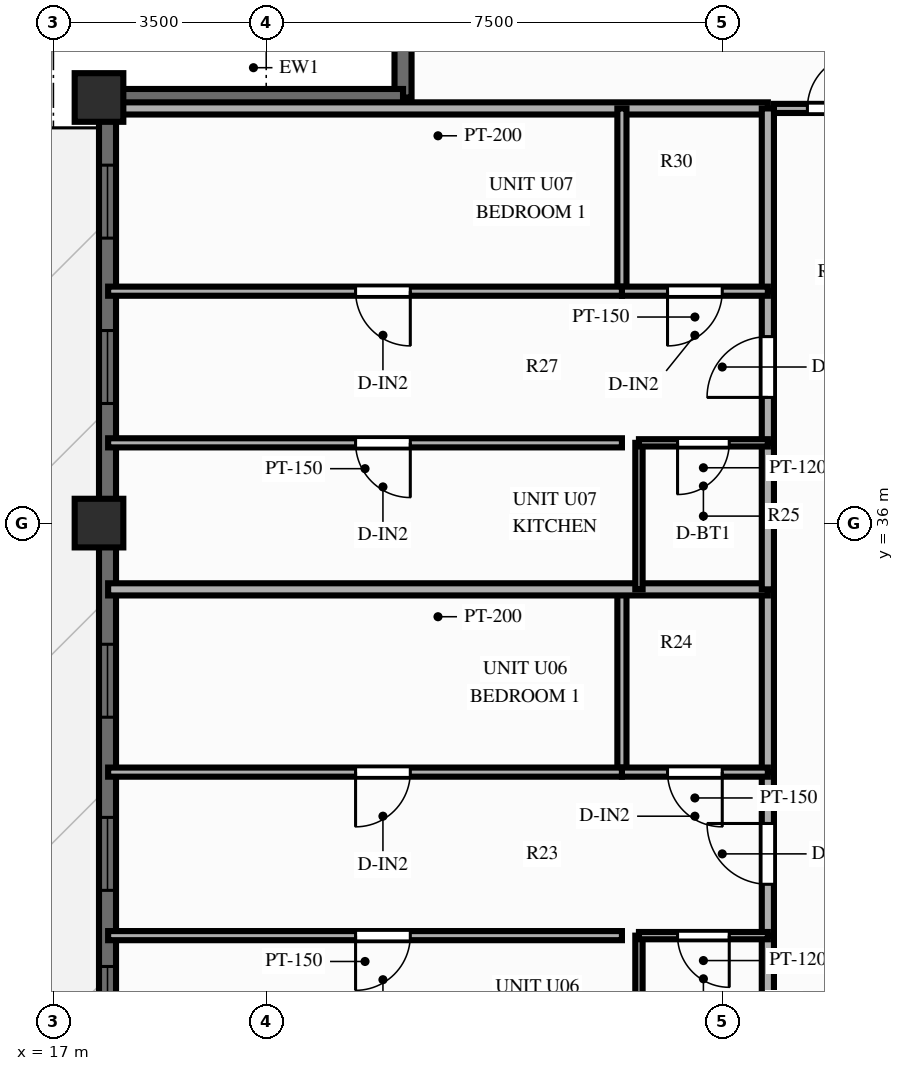
"""IFC4 building model, lengths in metres.
Left out: names, types, materials, properties, quantities, classifications, styles, units other than length and angle.
Written with IfcOpenShell. Run it as: python <this file> out.ifc"""

import sys

from ifc_helpers import new_model, si_unit, direction, frame, frame_2d, origin, origin_2d, place, context, subcontext, project, spatial, rectangle, extrude, source, transform, mapped, element, fill, save


model = new_model("IFC4")
c1 = context("Model", 3, precision=1e-05, world=origin(), true_north=direction((0.0, 1.0)))
c2 = subcontext(c1, "Body", "Model", "MODEL_VIEW")
j1 = project(units=[si_unit("LENGTHUNIT", "METRE"), si_unit("PLANEANGLEUNIT", "RADIAN")], contexts=[c1])
p1 = place(None, origin())
s1 = spatial("IfcSite", under=j1, at=p1, CompositionType="ELEMENT")
p2 = place(p1, origin())
s2 = spatial("IfcBuilding", under=s1, at=p2, CompositionType="ELEMENT")
p3 = place(p2, frame((0.0, 0.0, 189.7)))
s3 = spatial("IfcBuildingStorey", under=s2, at=p3, CompositionType="ELEMENT", Elevation=189.7)
m1 = source(origin(), c2, "Body", "SweptSolid", [
    extrude(rectangle(XDim=0.8, YDim=0.8, at=origin_2d()), origin(), (0.0, 0.0, 1.0), 3.0),
])
for number, where, z_axis, x_axis in (
    (1, (17.75, 43.0, 0.0), (0.0, 0.0, 1.0), (1.0, 0.0, 0.0)),
    (2, (17.75, 36.0, 0.0), (0.0, 0.0, 1.0), (1.0, 0.0, 0.0)),
):
    element("IfcColumn", number, at=place(p3, frame(where, z_axis=z_axis, x_axis=x_axis)), inside=s3, PredefinedType="COLUMN", context=c2, shape_type="MappedRepresentation", body=[
        mapped(m1, transform((0.0, 0.0, 0.0), scale=1.0)),
    ])
p4 = place(p3, frame((17.89, 11.0, 0.0), z_axis=(0.0, 0.0, 1.0), x_axis=(0.0, 1.0, 0.0)))
e3 = element("IfcWall", 3, at=p4, inside=s3, PredefinedType="SOLIDWALL", context=c2, shape_type="SweptSolid", body=[
    extrude(rectangle(XDim=32.0, YDim=0.28, at=frame_2d((16.0, 0.0))), origin(), (0.0, 0.0, 1.0), 2.28),
])
p5 = place(p4, frame((0.717, 0.0, 0.25)))
e4 = element("IfcOpeningElement", 4, at=p5, cuts=e3, PredefinedType="OPENING", context=c2, shape_type="SweptSolid", body=[
    extrude(rectangle(XDim=1.2, YDim=1.5, at=frame_2d((0.6, 0.75))), frame((0.0, 0.152, 0.0), z_axis=(0.0, -1.0, 0.0), x_axis=(1.0, 0.0, 0.0)), (0.0, 0.0, 1.0), 0.304),
])
p6 = place(p4, frame((3.139, 0.0, 0.25)))
e5 = element("IfcOpeningElement", 5, at=p6, cuts=e3, PredefinedType="OPENING", context=c2, shape_type="SweptSolid", body=[
    extrude(rectangle(XDim=1.2, YDim=1.5, at=frame_2d((0.6, 0.75))), frame((0.0, 0.152, 0.0), z_axis=(0.0, -1.0, 0.0), x_axis=(1.0, 0.0, 0.0)), (0.0, 0.0, 1.0), 0.304),
])
p7 = place(p4, frame((5.447, 0.0, 0.25)))
e6 = element("IfcOpeningElement", 6, at=p7, cuts=e3, PredefinedType="OPENING", context=c2, shape_type="SweptSolid", body=[
    extrude(rectangle(XDim=0.95, YDim=1.5, at=frame_2d((0.475, 0.75))), frame((0.0, 0.152, 0.0), z_axis=(0.0, -1.0, 0.0), x_axis=(1.0, 0.0, 0.0)), (0.0, 0.0, 1.0), 0.304),
])
p8 = place(p4, frame((8.597, 0.0, 0.25)))
e7 = element("IfcOpeningElement", 7, at=p8, cuts=e3, PredefinedType="OPENING", context=c2, shape_type="SweptSolid", body=[
    extrude(rectangle(XDim=1.2, YDim=1.5, at=frame_2d((0.6, 0.75))), frame((0.0, 0.152, 0.0), z_axis=(0.0, -1.0, 0.0), x_axis=(1.0, 0.0, 0.0)), (0.0, 0.0, 1.0), 0.304),
])
p9 = place(p4, frame((11.05, 0.0, 0.25)))
e8 = element("IfcOpeningElement", 8, at=p9, cuts=e3, PredefinedType="OPENING", context=c2, shape_type="SweptSolid", body=[
    extrude(rectangle(XDim=1.2, YDim=1.5, at=frame_2d((0.6, 0.75))), frame((0.0, 0.152, 0.0), z_axis=(0.0, -1.0, 0.0), x_axis=(1.0, 0.0, 0.0)), (0.0, 0.0, 1.0), 0.304),
])
p10 = place(p4, frame((13.697, 0.0, 0.0)))
e9 = element("IfcOpeningElement", 9, at=p10, cuts=e3, PredefinedType="OPENING", context=c2, shape_type="SweptSolid", body=[
    extrude(rectangle(XDim=1.6, YDim=2.15, at=frame_2d((0.8, 1.075))), frame((0.0, 0.152, 0.0), z_axis=(0.0, -1.0, 0.0), x_axis=(1.0, 0.0, 0.0)), (0.0, 0.0, 1.0), 0.304),
])
p11 = place(p4, frame((16.507, 0.0, 0.25)))
e10 = element("IfcOpeningElement", 10, at=p11, cuts=e3, PredefinedType="OPENING", context=c2, shape_type="SweptSolid", body=[
    extrude(rectangle(XDim=1.2, YDim=1.5, at=frame_2d((0.6, 0.75))), frame((0.0, 0.152, 0.0), z_axis=(0.0, -1.0, 0.0), x_axis=(1.0, 0.0, 0.0)), (0.0, 0.0, 1.0), 0.304),
])
p12 = place(p4, frame((18.959, 0.0, 0.25)))
e11 = element("IfcOpeningElement", 11, at=p12, cuts=e3, PredefinedType="OPENING", context=c2, shape_type="SweptSolid", body=[
    extrude(rectangle(XDim=1.2, YDim=1.5, at=frame_2d((0.6, 0.75))), frame((0.0, 0.152, 0.0), z_axis=(0.0, -1.0, 0.0), x_axis=(1.0, 0.0, 0.0)), (0.0, 0.0, 1.0), 0.304),
])
p13 = place(p4, frame((21.807, 0.0, 0.25)))
e12 = element("IfcOpeningElement", 12, at=p13, cuts=e3, PredefinedType="OPENING", context=c2, shape_type="SweptSolid", body=[
    extrude(rectangle(XDim=1.2, YDim=1.5, at=frame_2d((0.6, 0.75))), frame((0.0, 0.152, 0.0), z_axis=(0.0, -1.0, 0.0), x_axis=(1.0, 0.0, 0.0)), (0.0, 0.0, 1.0), 0.304),
])
p14 = place(p4, frame((26.967, 0.0, 0.25)))
e13 = element("IfcOpeningElement", 13, at=p14, cuts=e3, PredefinedType="OPENING", context=c2, shape_type="SweptSolid", body=[
    extrude(rectangle(XDim=1.2, YDim=1.5, at=frame_2d((0.6, 0.75))), frame((0.0, 0.152, 0.0), z_axis=(0.0, -1.0, 0.0), x_axis=(1.0, 0.0, 0.0)), (0.0, 0.0, 1.0), 0.304),
])
p15 = place(p4, frame((29.687, 0.0, 0.25)))
e14 = element("IfcOpeningElement", 14, at=p15, cuts=e3, PredefinedType="OPENING", context=c2, shape_type="SweptSolid", body=[
    extrude(rectangle(XDim=1.2, YDim=1.5, at=frame_2d((0.6, 0.75))), frame((0.0, 0.152, 0.0), z_axis=(0.0, -1.0, 0.0), x_axis=(1.0, 0.0, 0.0)), (0.0, 0.0, 1.0), 0.304),
])
for number, where, z_axis, x_axis in (
    (15, (22.75, 43.0, 0.0), (0.0, 0.0, 1.0), (0.0, 1.0, 0.0)),
    (16, (17.83, 43.0, 0.0), (0.0, 0.0, 1.0), (1.0, 0.0, 0.0)),
):
    element("IfcWall", number, at=place(p3, frame(where, z_axis=z_axis, x_axis=x_axis)), inside=s3, PredefinedType="SOLIDWALL", context=c2, shape_type="SweptSolid", body=[
        extrude(rectangle(XDim=4.92, YDim=0.28, at=frame_2d((2.46, 0.0))), origin(), (0.0, 0.0, 1.0), 2.28),
    ])
p16 = place(p3, frame((28.85, 42.82, 0.0), z_axis=(0.0, 0.0, 1.0), x_axis=(1.0, 0.0, 0.0)))
e17 = element("IfcWall", 17, at=p16, inside=s3, PredefinedType="PARTITIONING", context=c2, shape_type="SweptSolid", body=[
    extrude(rectangle(XDim=2.33, YDim=0.15, at=frame_2d((1.165, 0.0))), origin(), (0.0, 0.0, 1.0), 2.79),
])
p17 = place(p16, frame((0.55, 0.0, 0.0)))
e18 = element("IfcOpeningElement", 18, at=p17, cuts=e17, PredefinedType="OPENING", context=c2, shape_type="SweptSolid", body=[
    extrude(rectangle(XDim=0.9, YDim=2.1, at=frame_2d((0.45, 1.05))), frame((0.0, 0.087, 0.0), z_axis=(0.0, -1.0, 0.0), x_axis=(1.0, 0.0, 0.0)), (0.0, 0.0, 1.0), 0.174),
])
p18 = place(p3, frame((28.75, 42.82, 0.0), z_axis=(0.0, 0.0, 1.0), x_axis=(-1.0, 0.0, 0.0)))
e19 = element("IfcWall", 19, at=p18, inside=s3, PredefinedType="PARTITIONING", context=c2, shape_type="SweptSolid", body=[
    extrude(rectangle(XDim=10.85, YDim=0.2, at=frame_2d((5.425, 0.0))), origin(), (0.0, 0.0, 1.0), 2.79),
])
p19 = place(p3, frame((28.75, 27.0, 0.0), z_axis=(0.0, 0.0, 1.0), x_axis=(0.0, 1.0, 0.0)))
e20 = element("IfcWall", 20, at=p19, inside=s3, PredefinedType="PARTITIONING", context=c2, shape_type="SweptSolid", body=[
    extrude(rectangle(XDim=2.215, YDim=0.2, at=frame_2d((1.107, 0.0))), origin(), (0.0, 0.0, 1.0), 2.79),
])
p20 = place(p3, frame((28.75, 29.215, 0.0), z_axis=(0.0, 0.0, 1.0), x_axis=(0.0, 1.0, 0.0)))
e21 = element("IfcWall", 21, at=p20, inside=s3, PredefinedType="PARTITIONING", context=c2, shape_type="SweptSolid", body=[
    extrude(rectangle(XDim=2.689, YDim=0.2, at=frame_2d((1.345, 0.0))), origin(), (0.0, 0.0, 1.0), 2.79),
])
p21 = place(p20, frame((0.845, 0.0, 0.0)))
e22 = element("IfcOpeningElement", 22, at=p21, cuts=e21, PredefinedType="OPENING", context=c2, shape_type="SweptSolid", body=[
    extrude(rectangle(XDim=1.0, YDim=2.15, at=frame_2d((0.5, 1.075))), frame((0.0, 0.112, 0.0), z_axis=(0.0, -1.0, 0.0), x_axis=(1.0, 0.0, 0.0)), (0.0, 0.0, 1.0), 0.224),
])
p22 = place(p3, frame((28.75, 31.904, 0.0), z_axis=(0.0, 0.0, 1.0), x_axis=(0.0, 1.0, 0.0)))
e23 = element("IfcWall", 23, at=p22, inside=s3, PredefinedType="PARTITIONING", context=c2, shape_type="SweptSolid", body=[
    extrude(rectangle(XDim=3.006, YDim=0.2, at=frame_2d((1.503, 0.0))), origin(), (0.0, 0.0, 1.0), 2.79),
])
p23 = place(p3, frame((26.63, 27.0, 0.0), z_axis=(0.0, 0.0, 1.0), x_axis=(0.0, 1.0, 0.0)))
e24 = element("IfcWall", 24, at=p23, inside=s3, PredefinedType="PARTITIONING", context=c2, shape_type="SweptSolid", body=[
    extrude(rectangle(XDim=2.215, YDim=0.12, at=frame_2d((1.107, 0.0))), origin(), (0.0, 0.0, 1.0), 2.79),
])
p24 = place(p3, frame((26.35, 31.904, 0.0), z_axis=(0.0, 0.0, 1.0), x_axis=(0.0, 1.0, 0.0)))
e25 = element("IfcWall", 25, at=p24, inside=s3, PredefinedType="PARTITIONING", context=c2, shape_type="SweptSolid", body=[
    extrude(rectangle(XDim=3.006, YDim=0.15, at=frame_2d((1.503, 0.0))), origin(), (0.0, 0.0, 1.0), 2.79),
])
p25 = place(p3, frame((28.75, 29.215, 0.0), z_axis=(0.0, 0.0, 1.0), x_axis=(-1.0, 0.0, 0.0)))
e26 = element("IfcWall", 26, at=p25, inside=s3, PredefinedType="PARTITIONING", context=c2, shape_type="SweptSolid", body=[
    extrude(rectangle(XDim=2.12, YDim=0.12, at=frame_2d((1.06, 0.0))), origin(), (0.0, 0.0, 1.0), 2.79),
])
p26 = place(p25, frame((0.635, 0.0, 0.0)))
e27 = element("IfcOpeningElement", 27, at=p26, cuts=e26, PredefinedType="OPENING", context=c2, shape_type="SweptSolid", body=[
    extrude(rectangle(XDim=0.85, YDim=2.05, at=frame_2d((0.425, 1.025))), frame((0.0, 0.072, 0.0), z_axis=(0.0, -1.0, 0.0), x_axis=(1.0, 0.0, 0.0)), (0.0, 0.0, 1.0), 0.144),
])
p27 = place(p3, frame((26.35, 29.215, 0.0), z_axis=(0.0, 0.0, 1.0), x_axis=(-1.0, 0.0, 0.0)))
e28 = element("IfcWall", 28, at=p27, inside=s3, PredefinedType="PARTITIONING", context=c2, shape_type="SweptSolid", body=[
    extrude(rectangle(XDim=8.45, YDim=0.15, at=frame_2d((4.225, 0.0))), origin(), (0.0, 0.0, 1.0), 2.79),
])
p28 = place(p27, frame((3.48, 0.0, 0.0)))
e29 = element("IfcOpeningElement", 29, at=p28, cuts=e28, PredefinedType="OPENING", context=c2, shape_type="SweptSolid", body=[
    extrude(rectangle(XDim=0.9, YDim=2.1, at=frame_2d((0.45, 1.05))), frame((0.0, 0.087, 0.0), z_axis=(0.0, -1.0, 0.0), x_axis=(1.0, 0.0, 0.0)), (0.0, 0.0, 1.0), 0.174),
])
p29 = place(p3, frame((28.75, 31.904, 0.0), z_axis=(0.0, 0.0, 1.0), x_axis=(-1.0, 0.0, 0.0)))
e30 = element("IfcWall", 30, at=p29, inside=s3, PredefinedType="PARTITIONING", context=c2, shape_type="SweptSolid", body=[
    extrude(rectangle(XDim=2.4, YDim=0.15, at=frame_2d((1.2, 0.0))), origin(), (0.0, 0.0, 1.0), 2.39),
])
p30 = place(p29, frame((0.75, 0.0, 0.0)))
e31 = element("IfcOpeningElement", 31, at=p30, cuts=e30, PredefinedType="OPENING", context=c2, shape_type="SweptSolid", body=[
    extrude(rectangle(XDim=0.9, YDim=2.1, at=frame_2d((0.45, 1.05))), frame((0.0, 0.087, 0.0), z_axis=(0.0, -1.0, 0.0), x_axis=(1.0, 0.0, 0.0)), (0.0, 0.0, 1.0), 0.174),
])
p31 = place(p3, frame((26.35, 31.904, 0.0), z_axis=(0.0, 0.0, 1.0), x_axis=(-1.0, 0.0, 0.0)))
e32 = element("IfcWall", 32, at=p31, inside=s3, PredefinedType="PARTITIONING", context=c2, shape_type="SweptSolid", body=[
    extrude(rectangle(XDim=8.45, YDim=0.15, at=frame_2d((4.225, 0.0))), origin(), (0.0, 0.0, 1.0), 2.39),
])
p32 = place(p31, frame((3.48, 0.0, 0.0)))
e33 = element("IfcOpeningElement", 33, at=p32, cuts=e32, PredefinedType="OPENING", context=c2, shape_type="SweptSolid", body=[
    extrude(rectangle(XDim=0.9, YDim=2.1, at=frame_2d((0.45, 1.05))), frame((0.0, 0.087, 0.0), z_axis=(0.0, -1.0, 0.0), x_axis=(1.0, 0.0, 0.0)), (0.0, 0.0, 1.0), 0.174),
])
p33 = place(p3, frame((28.75, 34.91, 0.0), z_axis=(0.0, 0.0, 1.0), x_axis=(-1.0, 0.0, 0.0)))
e34 = element("IfcWall", 34, at=p33, inside=s3, PredefinedType="PARTITIONING", context=c2, shape_type="SweptSolid", body=[
    extrude(rectangle(XDim=10.85, YDim=0.2, at=frame_2d((5.425, 0.0))), origin(), (0.0, 0.0, 1.0), 2.79),
])
p34 = place(p3, frame((28.75, 34.91, 0.0), z_axis=(0.0, 0.0, 1.0), x_axis=(0.0, 1.0, 0.0)))
e35 = element("IfcWall", 35, at=p34, inside=s3, PredefinedType="PARTITIONING", context=c2, shape_type="SweptSolid", body=[
    extrude(rectangle(XDim=2.41, YDim=0.2, at=frame_2d((1.205, 0.0))), origin(), (0.0, 0.0, 1.0), 2.79),
])
p35 = place(p3, frame((28.75, 37.32, 0.0), z_axis=(0.0, 0.0, 1.0), x_axis=(0.0, 1.0, 0.0)))
e36 = element("IfcWall", 36, at=p35, inside=s3, PredefinedType="PARTITIONING", context=c2, shape_type="SweptSolid", body=[
    extrude(rectangle(XDim=2.494, YDim=0.2, at=frame_2d((1.247, 0.0))), origin(), (0.0, 0.0, 1.0), 2.79),
])
p36 = place(p35, frame((0.747, 0.0, 0.0)))
e37 = element("IfcOpeningElement", 37, at=p36, cuts=e36, PredefinedType="OPENING", context=c2, shape_type="SweptSolid", body=[
    extrude(rectangle(XDim=1.0, YDim=2.15, at=frame_2d((0.5, 1.075))), frame((0.0, 0.112, 0.0), z_axis=(0.0, -1.0, 0.0), x_axis=(1.0, 0.0, 0.0)), (0.0, 0.0, 1.0), 0.224),
])
p37 = place(p3, frame((28.75, 39.814, 0.0), z_axis=(0.0, 0.0, 1.0), x_axis=(0.0, 1.0, 0.0)))
e38 = element("IfcWall", 38, at=p37, inside=s3, PredefinedType="PARTITIONING", context=c2, shape_type="SweptSolid", body=[
    extrude(rectangle(XDim=3.006, YDim=0.2, at=frame_2d((1.503, 0.0))), origin(), (0.0, 0.0, 1.0), 2.79),
])
p38 = place(p3, frame((26.63, 34.91, 0.0), z_axis=(0.0, 0.0, 1.0), x_axis=(0.0, 1.0, 0.0)))
e39 = element("IfcWall", 39, at=p38, inside=s3, PredefinedType="PARTITIONING", context=c2, shape_type="SweptSolid", body=[
    extrude(rectangle(XDim=2.41, YDim=0.12, at=frame_2d((1.205, 0.0))), origin(), (0.0, 0.0, 1.0), 2.79),
])
p39 = place(p3, frame((26.35, 39.814, 0.0), z_axis=(0.0, 0.0, 1.0), x_axis=(0.0, 1.0, 0.0)))
e40 = element("IfcWall", 40, at=p39, inside=s3, PredefinedType="PARTITIONING", context=c2, shape_type="SweptSolid", body=[
    extrude(rectangle(XDim=3.006, YDim=0.15, at=frame_2d((1.503, 0.0))), origin(), (0.0, 0.0, 1.0), 2.79),
])
p40 = place(p3, frame((28.75, 37.32, 0.0), z_axis=(0.0, 0.0, 1.0), x_axis=(-1.0, 0.0, 0.0)))
e41 = element("IfcWall", 41, at=p40, inside=s3, PredefinedType="PARTITIONING", context=c2, shape_type="SweptSolid", body=[
    extrude(rectangle(XDim=2.12, YDim=0.12, at=frame_2d((1.06, 0.0))), origin(), (0.0, 0.0, 1.0), 2.79),
])
p41 = place(p40, frame((0.635, 0.0, 0.0)))
e42 = element("IfcOpeningElement", 42, at=p41, cuts=e41, PredefinedType="OPENING", context=c2, shape_type="SweptSolid", body=[
    extrude(rectangle(XDim=0.85, YDim=2.05, at=frame_2d((0.425, 1.025))), frame((0.0, 0.072, 0.0), z_axis=(0.0, -1.0, 0.0), x_axis=(1.0, 0.0, 0.0)), (0.0, 0.0, 1.0), 0.144),
])
p42 = place(p3, frame((26.35, 37.32, 0.0), z_axis=(0.0, 0.0, 1.0), x_axis=(-1.0, 0.0, 0.0)))
e43 = element("IfcWall", 43, at=p42, inside=s3, PredefinedType="PARTITIONING", context=c2, shape_type="SweptSolid", body=[
    extrude(rectangle(XDim=8.45, YDim=0.15, at=frame_2d((4.225, 0.0))), origin(), (0.0, 0.0, 1.0), 2.79),
])
p43 = place(p42, frame((3.48, 0.0, 0.0)))
e44 = element("IfcOpeningElement", 44, at=p43, cuts=e43, PredefinedType="OPENING", context=c2, shape_type="SweptSolid", body=[
    extrude(rectangle(XDim=0.9, YDim=2.1, at=frame_2d((0.45, 1.05))), frame((0.0, 0.087, 0.0), z_axis=(0.0, -1.0, 0.0), x_axis=(1.0, 0.0, 0.0)), (0.0, 0.0, 1.0), 0.174),
])
p44 = place(p3, frame((28.75, 39.814, 0.0), z_axis=(0.0, 0.0, 1.0), x_axis=(-1.0, 0.0, 0.0)))
e45 = element("IfcWall", 45, at=p44, inside=s3, PredefinedType="PARTITIONING", context=c2, shape_type="SweptSolid", body=[
    extrude(rectangle(XDim=2.4, YDim=0.15, at=frame_2d((1.2, 0.0))), origin(), (0.0, 0.0, 1.0), 2.79),
])
p45 = place(p44, frame((0.75, 0.0, 0.0)))
e46 = element("IfcOpeningElement", 46, at=p45, cuts=e45, PredefinedType="OPENING", context=c2, shape_type="SweptSolid", body=[
    extrude(rectangle(XDim=0.9, YDim=2.1, at=frame_2d((0.45, 1.05))), frame((0.0, 0.087, 0.0), z_axis=(0.0, -1.0, 0.0), x_axis=(1.0, 0.0, 0.0)), (0.0, 0.0, 1.0), 0.174),
])
p46 = place(p3, frame((26.35, 39.814, 0.0), z_axis=(0.0, 0.0, 1.0), x_axis=(-1.0, 0.0, 0.0)))
e47 = element("IfcWall", 47, at=p46, inside=s3, PredefinedType="PARTITIONING", context=c2, shape_type="SweptSolid", body=[
    extrude(rectangle(XDim=8.45, YDim=0.15, at=frame_2d((4.225, 0.0))), origin(), (0.0, 0.0, 1.0), 2.79),
])
p47 = place(p46, frame((3.48, 0.0, 0.0)))
e48 = element("IfcOpeningElement", 48, at=p47, cuts=e47, PredefinedType="OPENING", context=c2, shape_type="SweptSolid", body=[
    extrude(rectangle(XDim=0.9, YDim=2.1, at=frame_2d((0.45, 1.05))), frame((0.0, 0.087, 0.0), z_axis=(0.0, -1.0, 0.0), x_axis=(1.0, 0.0, 0.0)), (0.0, 0.0, 1.0), 0.174),
])
m2 = source(origin(), c2, "Body", "SweptSolid", [
    extrude(rectangle(XDim=1.2, YDim=1.5, at=frame_2d((0.6, 0.75))), frame((0.0, 0.03, 0.0), z_axis=(0.0, -1.0, 0.0), x_axis=(1.0, 0.0, 0.0)), (0.0, 0.0, 1.0), 0.06),
])
p48 = place(p11, origin())
e49 = element("IfcWindow", 49, at=p48, inside=s3, PartitioningType="SINGLE_PANEL", PredefinedType="WINDOW", context=c2, shape_type="MappedRepresentation", body=[
    mapped(m2, transform((0.0, 0.0, 0.0), scale=1.0)),
])
fill(e10, e49)
p49 = place(p12, origin())
e50 = element("IfcWindow", 50, at=p49, inside=s3, PartitioningType="SINGLE_PANEL", PredefinedType="WINDOW", context=c2, shape_type="MappedRepresentation", body=[
    mapped(m2, transform((0.0, 0.0, 0.0), scale=1.0)),
])
fill(e11, e50)
p50 = place(p13, origin())
e51 = element("IfcWindow", 51, at=p50, inside=s3, PartitioningType="SINGLE_PANEL", PredefinedType="WINDOW", context=c2, shape_type="MappedRepresentation", body=[
    mapped(m2, transform((0.0, 0.0, 0.0), scale=1.0)),
])
fill(e12, e51)
p51 = place(p14, origin())
e52 = element("IfcWindow", 52, at=p51, inside=s3, PartitioningType="SINGLE_PANEL", PredefinedType="WINDOW", context=c2, shape_type="MappedRepresentation", body=[
    mapped(m2, transform((0.0, 0.0, 0.0), scale=1.0)),
])
fill(e13, e52)
p52 = place(p15, origin())
e53 = element("IfcWindow", 53, at=p52, inside=s3, PartitioningType="SINGLE_PANEL", PredefinedType="WINDOW", context=c2, shape_type="MappedRepresentation", body=[
    mapped(m2, transform((0.0, 0.0, 0.0), scale=1.0)),
])
fill(e14, e53)
m3 = source(origin(), c2, "Body", "SweptSolid", [
    extrude(rectangle(XDim=0.9, YDim=2.1, at=frame_2d((0.45, 1.05))), frame((0.0, 0.025, 0.0), z_axis=(0.0, -1.0, 0.0), x_axis=(1.0, 0.0, 0.0)), (0.0, 0.0, 1.0), 0.05),
])
p53 = place(p17, origin())
e54 = element("IfcDoor", 54, at=p53, inside=s3, OperationType="SINGLE_SWING_RIGHT", PredefinedType="DOOR", context=c2, shape_type="MappedRepresentation", body=[
    mapped(m3, transform((0.0, 0.0, 0.0), scale=1.0)),
])
fill(e18, e54)
m4 = source(origin(), c2, "Body", "SweptSolid", [
    extrude(rectangle(XDim=1.0, YDim=2.15, at=frame_2d((0.5, 1.075))), frame((0.0, 0.025, 0.0), z_axis=(0.0, -1.0, 0.0), x_axis=(1.0, 0.0, 0.0)), (0.0, 0.0, 1.0), 0.05),
])
p54 = place(p21, origin())
e55 = element("IfcDoor", 55, at=p54, inside=s3, OperationType="SINGLE_SWING_RIGHT", PredefinedType="DOOR", context=c2, shape_type="MappedRepresentation", body=[
    mapped(m4, transform((0.0, 0.0, 0.0), scale=1.0)),
])
fill(e22, e55)
m5 = source(origin(), c2, "Body", "SweptSolid", [
    extrude(rectangle(XDim=0.85, YDim=2.05, at=frame_2d((0.425, 1.025))), frame((0.0, 0.025, 0.0), z_axis=(0.0, -1.0, 0.0), x_axis=(1.0, 0.0, 0.0)), (0.0, 0.0, 1.0), 0.05),
])
p55 = place(p26, origin())
e56 = element("IfcDoor", 56, at=p55, inside=s3, OperationType="SINGLE_SWING_LEFT", PredefinedType="DOOR", context=c2, shape_type="MappedRepresentation", body=[
    mapped(m5, transform((0.0, 0.0, 0.0), scale=1.0)),
])
fill(e27, e56)
p56 = place(p28, origin())
e57 = element("IfcDoor", 57, at=p56, inside=s3, OperationType="SINGLE_SWING_RIGHT", PredefinedType="DOOR", context=c2, shape_type="MappedRepresentation", body=[
    mapped(m3, transform((0.0, 0.0, 0.0), scale=1.0)),
])
fill(e29, e57)
p57 = place(p30, origin())
e58 = element("IfcDoor", 58, at=p57, inside=s3, OperationType="SINGLE_SWING_LEFT", PredefinedType="DOOR", context=c2, shape_type="MappedRepresentation", body=[
    mapped(m3, transform((0.0, 0.0, 0.0), scale=1.0)),
])
fill(e31, e58)
p58 = place(p32, origin())
e59 = element("IfcDoor", 59, at=p58, inside=s3, OperationType="SINGLE_SWING_RIGHT", PredefinedType="DOOR", context=c2, shape_type="MappedRepresentation", body=[
    mapped(m3, transform((0.0, 0.0, 0.0), scale=1.0)),
])
fill(e33, e59)
p59 = place(p36, origin())
e60 = element("IfcDoor", 60, at=p59, inside=s3, OperationType="SINGLE_SWING_LEFT", PredefinedType="DOOR", context=c2, shape_type="MappedRepresentation", body=[
    mapped(m4, transform((0.0, 0.0, 0.0), scale=1.0)),
])
fill(e37, e60)
p60 = place(p41, origin())
e61 = element("IfcDoor", 61, at=p60, inside=s3, OperationType="SINGLE_SWING_RIGHT", PredefinedType="DOOR", context=c2, shape_type="MappedRepresentation", body=[
    mapped(m5, transform((0.0, 0.0, 0.0), scale=1.0)),
])
fill(e42, e61)
p61 = place(p43, origin())
e62 = element("IfcDoor", 62, at=p61, inside=s3, OperationType="SINGLE_SWING_LEFT", PredefinedType="DOOR", context=c2, shape_type="MappedRepresentation", body=[
    mapped(m3, transform((0.0, 0.0, 0.0), scale=1.0)),
])
fill(e44, e62)
p62 = place(p45, origin())
e63 = element("IfcDoor", 63, at=p62, inside=s3, OperationType="SINGLE_SWING_RIGHT", PredefinedType="DOOR", context=c2, shape_type="MappedRepresentation", body=[
    mapped(m3, transform((0.0, 0.0, 0.0), scale=1.0)),
])
fill(e46, e63)
p63 = place(p47, origin())
e64 = element("IfcDoor", 64, at=p63, inside=s3, OperationType="SINGLE_SWING_LEFT", PredefinedType="DOOR", context=c2, shape_type="MappedRepresentation", body=[
    mapped(m3, transform((0.0, 0.0, 0.0), scale=1.0)),
])
fill(e48, e64)
save(model, sys.argv[1])
